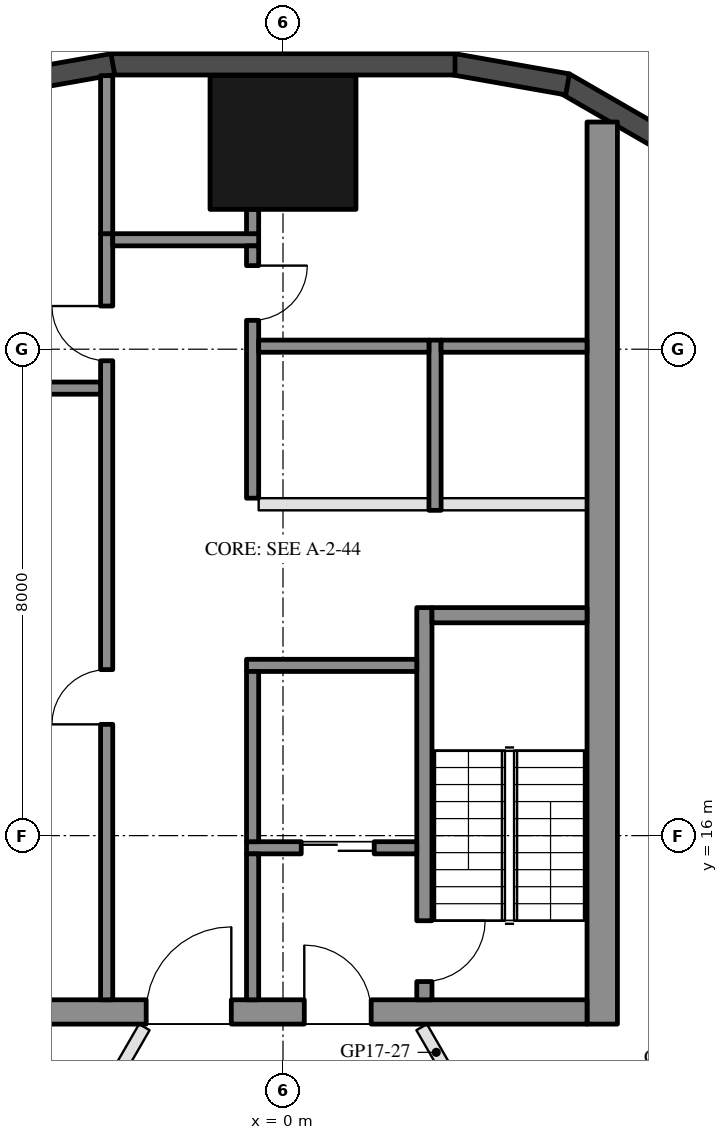
"""IFC4 building model, lengths in metres.
Left out: names, types, materials, properties, quantities, classifications, styles, units other than length and angle.
Written with IfcOpenShell. Run it as: python <this file> out.ifc"""

import sys

from ifc_helpers import new_model, si_unit, direction, frame, frame_2d, origin, origin_2d, place, context, subcontext, project, spatial, rectangle, hollow_rectangle, extrude, element, fill, save


model = new_model("IFC4")
c1 = context("Model", 3, precision=1e-05, world=origin(), true_north=direction((0.0, 1.0)))
c2 = subcontext(c1, "Body", "Model", "MODEL_VIEW")
j1 = project(units=[si_unit("LENGTHUNIT", "METRE"), si_unit("PLANEANGLEUNIT", "RADIAN")], contexts=[c1])
p1 = place(None, origin())
s1 = spatial("IfcSite", under=j1, at=p1, CompositionType="ELEMENT")
p2 = place(p1, origin())
s2 = spatial("IfcBuilding", under=s1, at=p2, CompositionType="ELEMENT")
p3 = place(p2, frame((0.0, 0.0, 187.3)))
s3 = spatial("IfcBuildingStorey", under=s2, at=p3, CompositionType="ELEMENT", Elevation=187.3)
p4 = place(p3, frame((0.0, 27.4, 0.0), z_axis=(0.0, 0.0, 1.0), x_axis=(1.0, 0.0, 0.0)))
e1 = element("IfcColumn", 1, at=p4, inside=s3, PredefinedType="COLUMN", context=c2, shape_type="SweptSolid", body=[
    extrude(hollow_rectangle(XDim=2.4, YDim=2.2, WallThickness=0.06, at=origin_2d()), origin(), (0.0, 0.0, 1.0), 3.7),
])
for number, where, z_axis, x_axis in (
    (2, (6.277, 27.422, 0.0), (0.0, 0.0, 1.0), (-0.866, 0.5, 0.0)),
    (3, (4.68, 28.356, 0.0), (0.0, 0.0, 1.0), (-0.985, 0.174, 0.0)),
):
    element("IfcWall", number, at=place(p3, frame(where, z_axis=z_axis, x_axis=x_axis)), inside=s3, PredefinedType="SOLIDWALL", context=c2, shape_type="SweptSolid", body=[
        extrude(rectangle(XDim=1.91, YDim=0.35, at=frame_2d((0.955, 0.0))), origin(), (0.0, 0.0, 1.0), 3.55),
    ])
p5 = place(p3, frame((2.829, 28.685, 0.0), z_axis=(0.0, 0.0, 1.0), x_axis=(-1.0, 0.0, 0.0)))
e4 = element("IfcWall", 4, at=p5, inside=s3, PredefinedType="SOLIDWALL", context=c2, shape_type="SweptSolid", body=[
    extrude(rectangle(XDim=5.658, YDim=0.35, at=frame_2d((2.829, 0.0))), origin(), (0.0, 0.0, 1.0), 3.55),
])
p6 = place(p3, frame((-2.799, 28.688, 0.0), z_axis=(0.0, 0.0, 1.0), x_axis=(-0.984798995425, -0.173697837091, 0.0)))
e5 = element("IfcWall", 5, at=p6, inside=s3, PredefinedType="SOLIDWALL", context=c2, shape_type="SweptSolid", body=[
    extrude(rectangle(XDim=1.91, YDim=0.35, at=frame_2d((0.955, 0.0))), origin(), (0.0, 0.0, 1.0), 3.55),
])
p7 = place(p3, frame((5.25, 12.9, 0.0), z_axis=(0.0, 0.0, 1.0), x_axis=(0.0, 1.0, 0.0)))
e6 = element("IfcWall", 6, at=p7, inside=s3, PredefinedType="SHEAR", context=c2, shape_type="SweptSolid", body=[
    extrude(rectangle(XDim=14.837, YDim=0.5, at=frame_2d((7.418, 0.0))), origin(), (0.0, 0.0, 1.0), 3.5),
])
p8 = place(p3, frame((5.0, 13.1, 0.0), z_axis=(0.0, 0.0, 1.0), x_axis=(-1.0, 0.0, 0.0)))
e7 = element("IfcWall", 7, at=p8, inside=s3, PredefinedType="SHEAR", context=c2, shape_type="SweptSolid", body=[
    extrude(rectangle(XDim=10.0, YDim=0.4, at=frame_2d((5.0, 0.0))), origin(), (0.0, 0.0, 1.0), 3.5),
])
p9 = place(p8, frame((3.55, 0.0, 0.0)))
e8 = element("IfcOpeningElement", 8, at=p9, cuts=e7, PredefinedType="OPENING", context=c2, shape_type="SweptSolid", body=[
    extrude(rectangle(XDim=1.1, YDim=2.1, at=frame_2d((0.55, 1.05))), frame((0.0, 0.21, 0.0), z_axis=(0.0, -1.0, 0.0), x_axis=(1.0, 0.0, 0.0)), (0.0, 0.0, 1.0), 0.42),
])
p10 = place(p8, frame((5.85, 0.0, 0.0)))
e9 = element("IfcOpeningElement", 9, at=p10, cuts=e7, PredefinedType="OPENING", context=c2, shape_type="SweptSolid", body=[
    extrude(rectangle(XDim=1.4, YDim=2.1, at=frame_2d((0.7, 1.05))), frame((0.0, 0.21, 0.0), z_axis=(0.0, -1.0, 0.0), x_axis=(1.0, 0.0, 0.0)), (0.0, 0.0, 1.0), 0.42),
])
p11 = place(p3, frame((2.325, 13.3, 0.0), z_axis=(0.0, 0.0, 1.0), x_axis=(0.0, 1.0, 0.0)))
e10 = element("IfcWall", 10, at=p11, inside=s3, PredefinedType="SHEAR", context=c2, shape_type="SweptSolid", body=[
    extrude(rectangle(XDim=6.45, YDim=0.25, at=frame_2d((3.225, 0.0))), origin(), (0.0, 0.0, 1.0), 3.5),
])
p12 = place(p11, frame((0.3, 0.0, 0.0)))
e11 = element("IfcOpeningElement", 11, at=p12, cuts=e10, PredefinedType="OPENING", context=c2, shape_type="SweptSolid", body=[
    extrude(rectangle(XDim=1.0, YDim=2.1, at=frame_2d((0.5, 1.05))), frame((0.0, 0.135, 0.0), z_axis=(0.0, -1.0, 0.0), x_axis=(1.0, 0.0, 0.0)), (0.0, 0.0, 1.0), 0.27),
])
p13 = place(p3, frame((5.0, 19.625, 0.0), z_axis=(0.0, 0.0, 1.0), x_axis=(-1.0, 0.0, 0.0)))
e12 = element("IfcWall", 12, at=p13, inside=s3, PredefinedType="SHEAR", context=c2, shape_type="SweptSolid", body=[
    extrude(rectangle(XDim=2.55, YDim=0.25, at=frame_2d((1.275, 0.0))), origin(), (0.0, 0.0, 1.0), 3.5),
])
p14 = place(p3, frame((2.2, 18.8, 0.0), z_axis=(0.0, 0.0, 1.0), x_axis=(-1.0, 0.0, 0.0)))
e13 = element("IfcWall", 13, at=p14, inside=s3, PredefinedType="SHEAR", context=c2, shape_type="SweptSolid", body=[
    extrude(rectangle(XDim=2.8, YDim=0.2, at=frame_2d((1.4, 0.0))), origin(), (0.0, 0.0, 1.0), 3.5),
])
p15 = place(p3, frame((2.2, 15.8, 0.0), z_axis=(0.0, 0.0, 1.0), x_axis=(-1.0, 0.0, 0.0)))
e14 = element("IfcWall", 14, at=p15, inside=s3, PredefinedType="SHEAR", context=c2, shape_type="SweptSolid", body=[
    extrude(rectangle(XDim=2.8, YDim=0.2, at=frame_2d((1.4, 0.0))), origin(), (0.0, 0.0, 1.0), 3.5),
])
p16 = place(p15, frame((0.7, 0.0, 0.0)))
e15 = element("IfcOpeningElement", 15, at=p16, cuts=e14, PredefinedType="OPENING", context=c2, shape_type="SweptSolid", body=[
    extrude(rectangle(XDim=1.2, YDim=2.1, at=frame_2d((0.6, 1.05))), frame((0.0, 0.11, 0.0), z_axis=(0.0, -1.0, 0.0), x_axis=(1.0, 0.0, 0.0)), (0.0, 0.0, 1.0), 0.22),
])
p17 = place(p3, frame((-0.5, 15.9, 0.0), z_axis=(0.0, 0.0, 1.0), x_axis=(0.0, 1.0, 0.0)))
e16 = element("IfcWall", 16, at=p17, inside=s3, PredefinedType="SHEAR", context=c2, shape_type="SweptSolid", body=[
    extrude(rectangle(XDim=2.8, YDim=0.2, at=frame_2d((1.4, 0.0))), origin(), (0.0, 0.0, 1.0), 3.5),
])
p18 = place(p3, frame((-0.5, 13.3, 0.0), z_axis=(0.0, 0.0, 1.0), x_axis=(0.0, 1.0, 0.0)))
e17 = element("IfcWall", 17, at=p18, inside=s3, PredefinedType="SHEAR", context=c2, shape_type="SweptSolid", body=[
    extrude(rectangle(XDim=2.4, YDim=0.2, at=frame_2d((1.2, 0.0))), origin(), (0.0, 0.0, 1.0), 3.5),
])
p19 = place(p3, frame((-2.9, 13.3, 0.0), z_axis=(0.0, 0.0, 1.0), x_axis=(0.0, 1.0, 0.0)))
e18 = element("IfcWall", 18, at=p19, inside=s3, PredefinedType="SHEAR", context=c2, shape_type="SweptSolid", body=[
    extrude(rectangle(XDim=12.6, YDim=0.2, at=frame_2d((6.3, 0.0))), origin(), (0.0, 0.0, 1.0), 3.5),
])
p20 = place(p19, frame((4.53, 0.0, 0.0)))
e19 = element("IfcOpeningElement", 19, at=p20, cuts=e18, PredefinedType="OPENING", context=c2, shape_type="SweptSolid", body=[
    extrude(rectangle(XDim=0.9, YDim=2.1, at=frame_2d((0.45, 1.05))), frame((0.0, 0.11, 0.0), z_axis=(0.0, -1.0, 0.0), x_axis=(1.0, 0.0, 0.0)), (0.0, 0.0, 1.0), 0.22),
])
p21 = place(p19, frame((10.51, 0.0, 0.0)))
e20 = element("IfcOpeningElement", 20, at=p21, cuts=e18, PredefinedType="OPENING", context=c2, shape_type="SweptSolid", body=[
    extrude(rectangle(XDim=0.9, YDim=2.1, at=frame_2d((0.45, 1.05))), frame((0.0, 0.11, 0.0), z_axis=(0.0, -1.0, 0.0), x_axis=(1.0, 0.0, 0.0)), (0.0, 0.0, 1.0), 0.22),
])
p22 = place(p3, frame((-0.4, 25.8, 0.0), z_axis=(0.0, 0.0, 1.0), x_axis=(-1.0, 0.0, 0.0)))
e21 = element("IfcWall", 21, at=p22, inside=s3, PredefinedType="SHEAR", context=c2, shape_type="SweptSolid", body=[
    extrude(rectangle(XDim=2.4, YDim=0.2, at=frame_2d((1.2, 0.0))), origin(), (0.0, 0.0, 1.0), 3.5),
])
p23 = place(p3, frame((-0.5, 21.55, 0.0), z_axis=(0.0, 0.0, 1.0), x_axis=(0.0, 1.0, 0.0)))
e22 = element("IfcWall", 22, at=p23, inside=s3, PredefinedType="SHEAR", context=c2, shape_type="SweptSolid", body=[
    extrude(rectangle(XDim=4.15, YDim=0.2, at=frame_2d((2.075, 0.0))), origin(), (0.0, 0.0, 1.0), 3.5),
])
p24 = place(p23, frame((2.925, 0.0, 0.0)))
e23 = element("IfcOpeningElement", 23, at=p24, cuts=e22, PredefinedType="OPENING", context=c2, shape_type="SweptSolid", body=[
    extrude(rectangle(XDim=0.9, YDim=2.1, at=frame_2d((0.45, 1.05))), frame((0.0, 0.11, 0.0), z_axis=(0.0, -1.0, 0.0), x_axis=(1.0, 0.0, 0.0)), (0.0, 0.0, 1.0), 0.22),
])
p25 = place(p3, frame((-3.0, 23.36, 0.0), z_axis=(0.0, 0.0, 1.0), x_axis=(-1.0, 0.0, 0.0)))
e24 = element("IfcWall", 24, at=p25, inside=s3, PredefinedType="SHEAR", context=c2, shape_type="SweptSolid", body=[
    extrude(rectangle(XDim=2.0, YDim=0.2, at=frame_2d((1.0, 0.0))), origin(), (0.0, 0.0, 1.0), 3.5),
])
p26 = place(p3, frame((-0.5, 25.9, 0.0), z_axis=(0.0, 0.0, 1.0), x_axis=(0.0, 1.0, 0.0)))
e25 = element("IfcWall", 25, at=p26, inside=s3, PredefinedType="SHEAR", context=c2, shape_type="SweptSolid", body=[
    extrude(rectangle(XDim=0.4, YDim=0.2, at=frame_2d((0.2, 0.0))), origin(), (0.0, 0.0, 1.0), 3.5),
])
p27 = place(p3, frame((-2.9, 25.9, 0.0), z_axis=(0.0, 0.0, 1.0), x_axis=(0.0, 1.0, 0.0)))
e26 = element("IfcWall", 26, at=p27, inside=s3, PredefinedType="SHEAR", context=c2, shape_type="SweptSolid", body=[
    extrude(rectangle(XDim=2.6, YDim=0.2, at=frame_2d((1.3, 0.0))), origin(), (0.0, 0.0, 1.0), 3.5),
])
p28 = place(p3, frame((2.5, 21.35, 0.0), z_axis=(0.0, 0.0, 1.0), x_axis=(0.0, 1.0, 0.0)))
e27 = element("IfcWall", 27, at=p28, inside=s3, PredefinedType="SHEAR", context=c2, shape_type="SweptSolid", body=[
    extrude(rectangle(XDim=2.8, YDim=0.2, at=frame_2d((1.4, 0.0))), origin(), (0.0, 0.0, 1.0), 3.5),
])
p29 = place(p3, frame((5.0, 24.05, 0.0), z_axis=(0.0, 0.0, 1.0), x_axis=(-1.0, 0.0, 0.0)))
e28 = element("IfcWall", 28, at=p29, inside=s3, PredefinedType="SHEAR", context=c2, shape_type="SweptSolid", body=[
    extrude(rectangle(XDim=2.4, YDim=0.2, at=frame_2d((1.2, 0.0))), origin(), (0.0, 0.0, 1.0), 3.5),
])
p30 = place(p3, frame((2.4, 24.05, 0.0), z_axis=(0.0, 0.0, 1.0), x_axis=(-1.0, 0.0, 0.0)))
e29 = element("IfcWall", 29, at=p30, inside=s3, PredefinedType="SHEAR", context=c2, shape_type="SweptSolid", body=[
    extrude(rectangle(XDim=2.8, YDim=0.2, at=frame_2d((1.4, 0.0))), origin(), (0.0, 0.0, 1.0), 3.5),
])
p31 = place(p3, frame((5.0, 21.45, 0.0), z_axis=(0.0, 0.0, 1.0), x_axis=(-1.0, 0.0, 0.0)))
e30 = element("IfcWall", 30, at=p31, inside=s3, PredefinedType="PARTITIONING", context=c2, shape_type="SweptSolid", body=[
    extrude(rectangle(XDim=2.4, YDim=0.2, at=frame_2d((1.2, 0.0))), origin(), (0.0, 0.0, 1.0), 3.5),
])
p32 = place(p3, frame((2.4, 21.45, 0.0), z_axis=(0.0, 0.0, 1.0), x_axis=(-1.0, 0.0, 0.0)))
e31 = element("IfcWall", 31, at=p32, inside=s3, PredefinedType="PARTITIONING", context=c2, shape_type="SweptSolid", body=[
    extrude(rectangle(XDim=2.8, YDim=0.2, at=frame_2d((1.4, 0.0))), origin(), (0.0, 0.0, 1.0), 3.5),
])
p33 = place(p3, frame((13.747, 14.75, 0.0), z_axis=(0.0, 0.0, 1.0), x_axis=(-0.866027479907, -0.499996404033, 0.0)))
e32 = element("IfcWall", 32, at=p33, inside=s3, PredefinedType="PARTITIONING", context=c2, shape_type="SweptSolid", body=[
    extrude(rectangle(XDim=10.98, YDim=0.2, at=frame_2d((5.49, 0.0))), origin(), (0.0, 0.0, 1.0), 3.06),
])
p34 = place(p3, frame((2.281, 12.85, 0.0), z_axis=(0.0, 0.0, 1.0), x_axis=(0.500010364181, -0.866019419939, 0.0)))
e33 = element("IfcWall", 33, at=p34, inside=s3, PredefinedType="PARTITIONING", context=c2, shape_type="SweptSolid", body=[
    extrude(rectangle(XDim=3.988, YDim=0.2, at=frame_2d((1.994, 0.0))), origin(), (0.0, 0.0, 1.0), 2.95),
])
p35 = place(p34, frame((1.494, 0.0, 0.0)))
e34 = element("IfcOpeningElement", 34, at=p35, cuts=e33, PredefinedType="OPENING", context=c2, shape_type="SweptSolid", body=[
    extrude(rectangle(XDim=1.0, YDim=2.1, at=frame_2d((0.5, 1.05))), frame((0.0, 0.11, 0.0), z_axis=(0.0, -1.0, 0.0), x_axis=(1.0, 0.0, 0.0)), (0.0, 0.0, 1.0), 0.22),
])
p36 = place(p3, frame((-4.725, 8.617, 0.0), z_axis=(0.0, 0.0, 1.0), x_axis=(0.499990498062, 0.866030889661, 0.0)))
e35 = element("IfcWall", 35, at=p36, inside=s3, PredefinedType="PARTITIONING", context=c2, shape_type="SweptSolid", body=[
    extrude(rectangle(XDim=4.888, YDim=0.2, at=frame_2d((2.444, 0.0))), origin(), (0.0, 0.0, 1.0), 2.95),
])
p37 = place(p36, frame((1.944, 0.0, 0.0)))
e36 = element("IfcOpeningElement", 36, at=p37, cuts=e35, PredefinedType="OPENING", context=c2, shape_type="SweptSolid", body=[
    extrude(rectangle(XDim=1.0, YDim=2.1, at=frame_2d((0.5, 1.05))), frame((0.0, 0.11, 0.0), z_axis=(0.0, -1.0, 0.0), x_axis=(1.0, 0.0, 0.0)), (0.0, 0.0, 1.0), 0.22),
])
p38 = place(p16, origin())
e37 = element("IfcDoor", 37, at=p38, inside=s3, OperationType="DOUBLE_DOOR_SLIDING", PredefinedType="DOOR", context=c2, shape_type="SweptSolid", body=[
    extrude(rectangle(XDim=1.2, YDim=2.1, at=frame_2d((0.6, 1.05))), frame((0.0, 0.025, 0.0), z_axis=(0.0, -1.0, 0.0), x_axis=(1.0, 0.0, 0.0)), (0.0, 0.0, 1.0), 0.05),
])
fill(e15, e37)
p39 = place(p20, origin())
e38 = element("IfcDoor", 38, at=p39, inside=s3, OperationType="SINGLE_SWING_LEFT", PredefinedType="DOOR", context=c2, shape_type="SweptSolid", body=[
    extrude(rectangle(XDim=0.9, YDim=2.1, at=frame_2d((0.45, 1.05))), frame((0.0, 0.025, 0.0), z_axis=(0.0, -1.0, 0.0), x_axis=(1.0, 0.0, 0.0)), (0.0, 0.0, 1.0), 0.05),
])
fill(e19, e38)
p40 = place(p21, origin())
e39 = element("IfcDoor", 39, at=p40, inside=s3, OperationType="SINGLE_SWING_RIGHT", PredefinedType="DOOR", context=c2, shape_type="SweptSolid", body=[
    extrude(rectangle(XDim=0.9, YDim=2.1, at=frame_2d((0.45, 1.05))), frame((0.0, 0.025, 0.0), z_axis=(0.0, -1.0, 0.0), x_axis=(1.0, 0.0, 0.0)), (0.0, 0.0, 1.0), 0.05),
])
fill(e20, e39)
p41 = place(p24, frame((0.9, 0.0, 0.0), z_axis=(0.0, 0.0, 1.0), x_axis=(-1.0, 0.0, 0.0)))
e40 = element("IfcDoor", 40, at=p41, inside=s3, OperationType="SINGLE_SWING_LEFT", PredefinedType="DOOR", context=c2, shape_type="SweptSolid", body=[
    extrude(rectangle(XDim=0.9, YDim=2.1, at=frame_2d((0.45, 1.05))), frame((0.0, 0.025, 0.0), z_axis=(0.0, -1.0, 0.0), x_axis=(1.0, 0.0, 0.0)), (0.0, 0.0, 1.0), 0.05),
])
fill(e23, e40)
p42 = place(p9, frame((1.1, 0.0, 0.0), z_axis=(0.0, 0.0, 1.0), x_axis=(-1.0, 0.0, 0.0)))
e41 = element("IfcDoor", 41, at=p42, inside=s3, OperationType="SINGLE_SWING_LEFT", PredefinedType="DOOR", context=c2, shape_type="SweptSolid", body=[
    extrude(rectangle(XDim=1.1, YDim=2.1, at=frame_2d((0.55, 1.05))), frame((0.0, 0.025, 0.0), z_axis=(0.0, -1.0, 0.0), x_axis=(1.0, 0.0, 0.0)), (0.0, 0.0, 1.0), 0.05),
])
fill(e8, e41)
p43 = place(p10, frame((1.4, 0.0, 0.0), z_axis=(0.0, 0.0, 1.0), x_axis=(-1.0, 0.0, 0.0)))
e42 = element("IfcDoor", 42, at=p43, inside=s3, OperationType="DOUBLE_DOOR_SINGLE_SWING", PredefinedType="DOOR", context=c2, shape_type="SweptSolid", body=[
    extrude(rectangle(XDim=1.4, YDim=2.1, at=frame_2d((0.7, 1.05))), frame((0.0, 0.025, 0.0), z_axis=(0.0, -1.0, 0.0), x_axis=(1.0, 0.0, 0.0)), (0.0, 0.0, 1.0), 0.05),
])
fill(e9, e42)
p44 = place(p12, frame((1.0, 0.0, 0.0), z_axis=(0.0, 0.0, 1.0), x_axis=(-1.0, 0.0, 0.0)))
e43 = element("IfcDoor", 43, at=p44, inside=s3, OperationType="SINGLE_SWING_LEFT", PredefinedType="DOOR", context=c2, shape_type="SweptSolid", body=[
    extrude(rectangle(XDim=1.0, YDim=2.1, at=frame_2d((0.5, 1.05))), frame((0.0, 0.025, 0.0), z_axis=(0.0, -1.0, 0.0), x_axis=(1.0, 0.0, 0.0)), (0.0, 0.0, 1.0), 0.05),
])
fill(e11, e43)
save(model, sys.argv[1])
